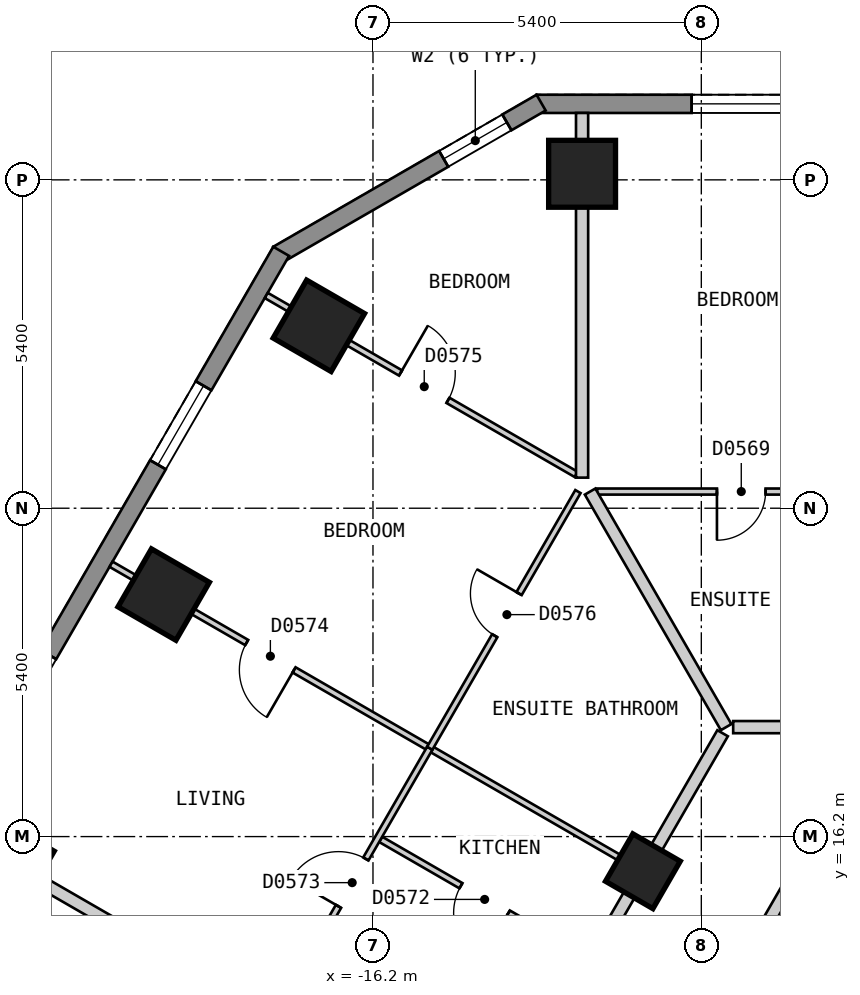
"""IFC4 building model, lengths in metres.
Left out: names, types, materials, properties, quantities, classifications, styles, units other than length and angle.
Written with IfcOpenShell. Run it as: python <this file> out.ifc"""

import sys

from ifc_helpers import new_model, si_unit, direction, frame, frame_2d, origin, origin_2d, place, context, subcontext, project, spatial, polyline, rectangle, outline, extrude, element, fill, save


model = new_model("IFC4")
c1 = context("Model", 3, precision=1e-05, world=origin(), true_north=direction((0.0, 1.0)))
c2 = subcontext(c1, "Body", "Model", "MODEL_VIEW")
j1 = project(units=[si_unit("LENGTHUNIT", "METRE"), si_unit("PLANEANGLEUNIT", "RADIAN")], contexts=[c1])
p1 = place(None, origin())
s1 = spatial("IfcSite", under=j1, at=p1, CompositionType="ELEMENT")
p2 = place(p1, origin())
s2 = spatial("IfcBuilding", under=s1, at=p2, CompositionType="ELEMENT")
p3 = place(p2, frame((0.0, 0.0, 50.4)))
s3 = spatial("IfcBuildingStorey", under=s2, at=p3, CompositionType="ELEMENT", Elevation=50.4)
for number, where, z_axis, x_axis in (
    (1, (-12.761, 27.1, 0.0), (0.0, 0.0, 1.0), (-1.0, 0.0, 0.0)),
    (2, (-17.09, 24.6, 0.0), (0.0, 0.0, 1.0), (-0.5, -0.866, 0.0)),
    (3, (-19.642, 20.18, 0.0), (0.0, 0.0, 1.0), (-0.5, -0.866, 0.0)),
    (4, (-22.194, 15.759, 0.0), (0.0, 0.0, 1.0), (-0.5, -0.866, 0.0)),
):
    element("IfcColumn", number, at=place(p3, frame(where, z_axis=z_axis, x_axis=x_axis)), inside=s3, PredefinedType="COLUMN", context=c2, shape_type="SweptSolid", body=[
        extrude(rectangle(XDim=1.1, YDim=1.1, at=origin_2d()), origin(), (0.0, 0.0, 1.0), 3.0),
    ])
p4 = place(p3, frame((-11.761, 15.63, 0.0), z_axis=(0.0, 0.0, 1.0), x_axis=(-0.499984884929, -0.866034130299, 0.0)))
e5 = element("IfcColumn", 5, at=p4, inside=s3, PredefinedType="COLUMN", context=c2, shape_type="SweptSolid", body=[
    extrude(rectangle(XDim=0.9, YDim=0.9, at=origin_2d()), origin(), (0.0, 0.0, 1.0), 3.0),
])
p5 = place(p3, frame((13.51, 28.25, 0.0), z_axis=(0.0, 0.0, 1.0), x_axis=(-1.0, 0.0, 0.0)))
e6 = element("IfcWall", 6, at=p5, inside=s3, PredefinedType="SOLIDWALL", context=c2, shape_type="SweptSolid", body=[
    extrude(outline(polyline([(0.0, -0.15), (27.02, -0.15), (26.94, 0.15), (0.08, 0.15), (0.0, -0.15)])), origin(), (0.0, 0.0, 1.0), 2.7),
])
p6 = place(p5, frame((2.553, 0.0, 0.15)))
e7 = element("IfcOpeningElement", 7, at=p6, cuts=e6, PredefinedType="OPENING", context=c2, shape_type="SweptSolid", body=[
    extrude(rectangle(XDim=1.5, YDim=2.1, at=frame_2d((0.75, 1.05))), frame((0.0, 0.16, 0.0), z_axis=(0.0, -1.0, 0.0), x_axis=(1.0, 0.0, 0.0)), (0.0, 0.0, 1.0), 0.32),
])
p7 = place(p5, frame((7.657, 0.0, 0.15)))
e8 = element("IfcOpeningElement", 8, at=p7, cuts=e6, PredefinedType="OPENING", context=c2, shape_type="SweptSolid", body=[
    extrude(rectangle(XDim=1.5, YDim=2.1, at=frame_2d((0.75, 1.05))), frame((0.0, 0.16, 0.0), z_axis=(0.0, -1.0, 0.0), x_axis=(1.0, 0.0, 0.0)), (0.0, 0.0, 1.0), 0.32),
])
p8 = place(p5, frame((12.761, 0.0, 0.15)))
e9 = element("IfcOpeningElement", 9, at=p8, cuts=e6, PredefinedType="OPENING", context=c2, shape_type="SweptSolid", body=[
    extrude(rectangle(XDim=1.5, YDim=2.1, at=frame_2d((0.75, 1.05))), frame((0.0, 0.16, 0.0), z_axis=(0.0, -1.0, 0.0), x_axis=(1.0, 0.0, 0.0)), (0.0, 0.0, 1.0), 0.32),
])
p9 = place(p5, frame((17.865, 0.0, 0.15)))
e10 = element("IfcOpeningElement", 10, at=p9, cuts=e6, PredefinedType="OPENING", context=c2, shape_type="SweptSolid", body=[
    extrude(rectangle(XDim=1.5, YDim=2.1, at=frame_2d((0.75, 1.05))), frame((0.0, 0.16, 0.0), z_axis=(0.0, -1.0, 0.0), x_axis=(1.0, 0.0, 0.0)), (0.0, 0.0, 1.0), 0.32),
])
p10 = place(p5, frame((22.969, 0.0, 0.15)))
e11 = element("IfcOpeningElement", 11, at=p10, cuts=e6, PredefinedType="OPENING", context=c2, shape_type="SweptSolid", body=[
    extrude(rectangle(XDim=1.5, YDim=2.1, at=frame_2d((0.75, 1.05))), frame((0.0, 0.16, 0.0), z_axis=(0.0, -1.0, 0.0), x_axis=(1.0, 0.0, 0.0)), (0.0, 0.0, 1.0), 0.32),
])
p11 = place(p3, frame((-13.435, 28.27, 0.0), z_axis=(0.0, 0.0, 1.0), x_axis=(-0.866010750942, -0.50002537861, 0.0)))
e12 = element("IfcWall", 12, at=p11, inside=s3, PredefinedType="SOLIDWALL", context=c2, shape_type="SweptSolid", body=[
    extrude(outline(polyline([(0.0, -0.15), (5.0, -0.15), (4.919, 0.15), (0.08, 0.15), (0.0, -0.15)])), origin(), (0.0, 0.0, 1.0), 2.7),
])
p12 = place(p11, frame((0.65, 0.0, 0.15)))
e13 = element("IfcOpeningElement", 13, at=p12, cuts=e12, PredefinedType="OPENING", context=c2, shape_type="SweptSolid", body=[
    extrude(rectangle(XDim=1.2, YDim=2.1, at=frame_2d((0.6, 1.05))), frame((0.0, 0.16, 0.0), z_axis=(0.0, -1.0, 0.0), x_axis=(1.0, 0.0, 0.0)), (0.0, 0.0, 1.0), 0.32),
])
p13 = place(p3, frame((-17.71, 25.825, 0.0), z_axis=(0.0, 0.0, 1.0), x_axis=(-0.500001938803, -0.866024284413, 0.0)))
e14 = element("IfcWall", 14, at=p13, inside=s3, PredefinedType="SOLIDWALL", context=c2, shape_type="SweptSolid", body=[
    extrude(outline(polyline([(0.0, -0.15), (27.02, -0.15), (26.94, 0.15), (0.08, 0.15), (0.0, -0.15)])), origin(), (0.0, 0.0, 1.0), 2.7),
])
p14 = place(p13, frame((2.553, 0.0, 0.15)))
e15 = element("IfcOpeningElement", 15, at=p14, cuts=e14, PredefinedType="OPENING", context=c2, shape_type="SweptSolid", body=[
    extrude(rectangle(XDim=1.5, YDim=2.1, at=frame_2d((0.75, 1.05))), frame((0.0, 0.16, 0.0), z_axis=(0.0, -1.0, 0.0), x_axis=(1.0, 0.0, 0.0)), (0.0, 0.0, 1.0), 0.32),
])
p15 = place(p13, frame((7.658, 0.0, 0.15)))
e16 = element("IfcOpeningElement", 16, at=p15, cuts=e14, PredefinedType="OPENING", context=c2, shape_type="SweptSolid", body=[
    extrude(rectangle(XDim=1.5, YDim=2.1, at=frame_2d((0.75, 1.05))), frame((0.0, 0.16, 0.0), z_axis=(0.0, -1.0, 0.0), x_axis=(1.0, 0.0, 0.0)), (0.0, 0.0, 1.0), 0.32),
])
p16 = place(p13, frame((12.761, 0.0, 0.15)))
e17 = element("IfcOpeningElement", 17, at=p16, cuts=e14, PredefinedType="OPENING", context=c2, shape_type="SweptSolid", body=[
    extrude(rectangle(XDim=1.5, YDim=2.1, at=frame_2d((0.75, 1.05))), frame((0.0, 0.16, 0.0), z_axis=(0.0, -1.0, 0.0), x_axis=(1.0, 0.0, 0.0)), (0.0, 0.0, 1.0), 0.32),
])
p17 = place(p13, frame((17.865, 0.0, 0.15)))
e18 = element("IfcOpeningElement", 18, at=p17, cuts=e14, PredefinedType="OPENING", context=c2, shape_type="SweptSolid", body=[
    extrude(rectangle(XDim=1.5, YDim=2.1, at=frame_2d((0.75, 1.05))), frame((0.0, 0.16, 0.0), z_axis=(0.0, -1.0, 0.0), x_axis=(1.0, 0.0, 0.0)), (0.0, 0.0, 1.0), 0.32),
])
p18 = place(p13, frame((22.969, 0.0, 0.15)))
e19 = element("IfcOpeningElement", 19, at=p18, cuts=e14, PredefinedType="OPENING", context=c2, shape_type="SweptSolid", body=[
    extrude(rectangle(XDim=1.5, YDim=2.1, at=frame_2d((0.75, 1.05))), frame((0.0, 0.16, 0.0), z_axis=(0.0, -1.0, 0.0), x_axis=(1.0, 0.0, 0.0)), (0.0, 0.0, 1.0), 0.32),
])
p19 = place(p3, frame((-10.276, 18.0, 0.0), z_axis=(0.0, 0.0, 1.0), x_axis=(1.0, 0.0, 0.0)))
e20 = element("IfcWall", 20, at=p19, inside=s3, PredefinedType="PARTITIONING", context=c2, shape_type="SweptSolid", body=[
    extrude(rectangle(XDim=20.553, YDim=0.2, at=frame_2d((10.276, 0.0))), origin(), (0.0, 0.0, 1.0), 2.7),
])
p20 = place(p19, frame((14.879, 0.0, 0.0)))
e21 = element("IfcOpeningElement", 21, at=p20, cuts=e20, PredefinedType="OPENING", context=c2, shape_type="SweptSolid", body=[
    extrude(rectangle(XDim=1.0, YDim=2.1, at=frame_2d((0.5, 1.05))), frame((0.0, 0.11, 0.0), z_axis=(0.0, -1.0, 0.0), x_axis=(1.0, 0.0, 0.0)), (0.0, 0.0, 1.0), 0.22),
])
p21 = place(p19, frame((4.671, 0.0, 0.0)))
e22 = element("IfcOpeningElement", 22, at=p21, cuts=e20, PredefinedType="OPENING", context=c2, shape_type="SweptSolid", body=[
    extrude(rectangle(XDim=1.0, YDim=2.1, at=frame_2d((0.5, 1.05))), frame((0.0, 0.11, 0.0), z_axis=(0.0, -1.0, 0.0), x_axis=(1.0, 0.0, 0.0)), (0.0, 0.0, 1.0), 0.22),
])
p22 = place(p3, frame((-10.854, 8.0, 0.0), z_axis=(0.0, 0.0, 1.0), x_axis=(0.499964141897, 0.86604610548, 0.0)))
e23 = element("IfcWall", 23, at=p22, inside=s3, PredefinedType="PARTITIONING", context=c2, shape_type="SweptSolid", body=[
    extrude(rectangle(XDim=9.007, YDim=0.2, at=frame_2d((4.503, 0.0))), origin(), (0.0, 0.0, 1.0), 2.7),
])
p23 = place(p3, frame((-18.244, -0.001, 0.0), z_axis=(0.0, 0.0, 1.0), x_axis=(0.499962999376, 0.866046765051, 0.0)))
e24 = element("IfcWall", 24, at=p23, inside=s3, PredefinedType="PARTITIONING", context=c2, shape_type="SweptSolid", body=[
    extrude(rectangle(XDim=18.245, YDim=0.2, at=frame_2d((9.123, 0.0))), origin(), (0.0, 0.0, 1.0), 2.7),
])
p24 = place(p23, frame((8.672, 0.0, 0.0)))
e25 = element("IfcOpeningElement", 25, at=p24, cuts=e24, PredefinedType="OPENING", context=c2, shape_type="SweptSolid", body=[
    extrude(rectangle(XDim=0.9, YDim=2.1, at=frame_2d((0.45, 1.05))), frame((0.0, 0.11, 0.0), z_axis=(0.0, -1.0, 0.0), x_axis=(1.0, 0.0, 0.0)), (0.0, 0.0, 1.0), 0.22),
])
p25 = place(p3, frame((-20.727, 0.099, 0.0), z_axis=(0.0, 0.0, 1.0), x_axis=(0.499993204491, 0.866029327138, 0.0)))
e26 = element("IfcWall", 26, at=p25, inside=s3, PredefinedType="PARTITIONING", context=c2, shape_type="SweptSolid", body=[
    extrude(rectangle(XDim=20.554, YDim=0.2, at=frame_2d((10.277, 0.0))), origin(), (0.0, 0.0, 1.0), 2.7),
])
p26 = place(p25, frame((9.776, 0.0, 0.0)))
e27 = element("IfcOpeningElement", 27, at=p26, cuts=e26, PredefinedType="OPENING", context=c2, shape_type="SweptSolid", body=[
    extrude(rectangle(XDim=1.0, YDim=2.1, at=frame_2d((0.5, 1.05))), frame((0.0, 0.11, 0.0), z_axis=(0.0, -1.0, 0.0), x_axis=(1.0, 0.0, 0.0)), (0.0, 0.0, 1.0), 0.22),
])
p27 = place(p25, frame((4.673, 0.0, 0.0)))
e28 = element("IfcOpeningElement", 28, at=p27, cuts=e26, PredefinedType="OPENING", context=c2, shape_type="SweptSolid", body=[
    extrude(rectangle(XDim=1.0, YDim=2.1, at=frame_2d((0.5, 1.05))), frame((0.0, 0.11, 0.0), z_axis=(0.0, -1.0, 0.0), x_axis=(1.0, 0.0, 0.0)), (0.0, 0.0, 1.0), 0.22),
])
p28 = place(p25, frame((14.88, 0.0, 0.0)))
e29 = element("IfcOpeningElement", 29, at=p28, cuts=e26, PredefinedType="OPENING", context=c2, shape_type="SweptSolid", body=[
    extrude(rectangle(XDim=1.0, YDim=2.1, at=frame_2d((0.5, 1.05))), frame((0.0, 0.11, 0.0), z_axis=(0.0, -1.0, 0.0), x_axis=(1.0, 0.0, 0.0)), (0.0, 0.0, 1.0), 0.22),
])
p29 = place(p3, frame((-16.073, 16.154, 0.0), z_axis=(0.0, 0.0, 1.0), x_axis=(0.865979019114, -0.500080332001, 0.0)))
e30 = element("IfcWall", 30, at=p29, inside=s3, PredefinedType="PARTITIONING", context=c2, shape_type="SweptSolid", body=[
    extrude(rectangle(XDim=3.897, YDim=0.1, at=frame_2d((1.949, 0.0))), origin(), (0.0, 0.0, 1.0), 2.7),
])
p30 = place(p29, frame((1.524, 0.0, 0.0)))
e31 = element("IfcOpeningElement", 31, at=p30, cuts=e30, PredefinedType="OPENING", context=c2, shape_type="SweptSolid", body=[
    extrude(rectangle(XDim=0.9, YDim=2.1, at=frame_2d((0.45, 1.05))), frame((0.0, 0.06, 0.0), z_axis=(0.0, -1.0, 0.0), x_axis=(1.0, 0.0, 0.0)), (0.0, 0.0, 1.0), 0.12),
])
p31 = place(p3, frame((-20.508, 20.679, 0.0), z_axis=(0.0, 0.0, 1.0), x_axis=(0.866047370643, -0.499961950354, 0.0)))
e32 = element("IfcWall", 32, at=p31, inside=s3, PredefinedType="PARTITIONING", context=c2, shape_type="SweptSolid", body=[
    extrude(rectangle(XDim=10.001, YDim=0.1, at=frame_2d((5.0, 0.0))), origin(), (0.0, 0.0, 1.0), 2.7),
])
p32 = place(p31, frame((2.576, 0.0, 0.0)))
e33 = element("IfcOpeningElement", 33, at=p32, cuts=e32, PredefinedType="OPENING", context=c2, shape_type="SweptSolid", body=[
    extrude(rectangle(XDim=0.9, YDim=2.1, at=frame_2d((0.45, 1.05))), frame((0.0, 0.06, 0.0), z_axis=(0.0, -1.0, 0.0), x_axis=(1.0, 0.0, 0.0)), (0.0, 0.0, 1.0), 0.12),
])
p33 = place(p3, frame((-17.955, 25.099, 0.0), z_axis=(0.0, 0.0, 1.0), x_axis=(0.866036353684, -0.499981033738, 0.0)))
e34 = element("IfcWall", 34, at=p33, inside=s3, PredefinedType="PARTITIONING", context=c2, shape_type="SweptSolid", body=[
    extrude(rectangle(XDim=5.885, YDim=0.1, at=frame_2d((2.942, 0.0))), origin(), (0.0, 0.0, 1.0), 2.7),
])
p34 = place(p33, frame((2.55, 0.0, 0.0)))
e35 = element("IfcOpeningElement", 35, at=p34, cuts=e34, PredefinedType="OPENING", context=c2, shape_type="SweptSolid", body=[
    extrude(rectangle(XDim=0.9, YDim=2.1, at=frame_2d((0.45, 1.05))), frame((0.0, 0.06, 0.0), z_axis=(0.0, -1.0, 0.0), x_axis=(1.0, 0.0, 0.0)), (0.0, 0.0, 1.0), 0.12),
])
p35 = place(p3, frame((-12.513, 21.874, 0.0), z_axis=(0.0, 0.0, 1.0), x_axis=(1.0, 0.0, 0.0)))
e36 = element("IfcWall", 36, at=p35, inside=s3, PredefinedType="PARTITIONING", context=c2, shape_type="SweptSolid", body=[
    extrude(rectangle(XDim=4.806, YDim=0.1, at=frame_2d((2.403, 0.0))), origin(), (0.0, 0.0, 1.0), 2.7),
])
p36 = place(p35, frame((1.97, 0.0, 0.0)))
e37 = element("IfcOpeningElement", 37, at=p36, cuts=e36, PredefinedType="OPENING", context=c2, shape_type="SweptSolid", body=[
    extrude(rectangle(XDim=0.8, YDim=2.1, at=frame_2d((0.4, 1.05))), frame((0.0, 0.06, 0.0), z_axis=(0.0, -1.0, 0.0), x_axis=(1.0, 0.0, 0.0)), (0.0, 0.0, 1.0), 0.12),
])
p37 = place(p3, frame((-17.768, 13.319, 0.0), z_axis=(0.0, 0.0, 1.0), x_axis=(0.499958946799, 0.866049104564, 0.0)))
e38 = element("IfcWall", 38, at=p37, inside=s3, PredefinedType="PARTITIONING", context=c2, shape_type="SweptSolid", body=[
    extrude(rectangle(XDim=5.004, YDim=0.1, at=frame_2d((2.502, 0.0))), origin(), (0.0, 0.0, 1.0), 2.7),
])
p38 = place(p37, frame((2.002, 0.0, 0.0)))
e39 = element("IfcOpeningElement", 39, at=p38, cuts=e38, PredefinedType="OPENING", context=c2, shape_type="SweptSolid", body=[
    extrude(rectangle(XDim=0.9, YDim=2.1, at=frame_2d((0.45, 1.05))), frame((0.0, 0.06, 0.0), z_axis=(0.0, -1.0, 0.0), x_axis=(1.0, 0.0, 0.0)), (0.0, 0.0, 1.0), 0.12),
])
p39 = place(p3, frame((-12.629, 21.874, 0.0), z_axis=(0.0, 0.0, 1.0), x_axis=(0.500024801635, -0.86601108408, 0.0)))
e40 = element("IfcWall", 40, at=p39, inside=s3, PredefinedType="PARTITIONING", context=c2, shape_type="SweptSolid", body=[
    extrude(rectangle(XDim=4.473, YDim=0.2, at=frame_2d((2.237, 0.0))), origin(), (0.0, 0.0, 1.0), 2.7),
])
p40 = place(p3, frame((-23.06, 16.259, 0.0), z_axis=(0.0, 0.0, 1.0), x_axis=(0.866047370643, -0.499961950354, 0.0)))
e41 = element("IfcWall", 41, at=p40, inside=s3, PredefinedType="PARTITIONING", context=c2, shape_type="SweptSolid", body=[
    extrude(rectangle(XDim=10.001, YDim=0.2, at=frame_2d((5.0, 0.0))), origin(), (0.0, 0.0, 1.0), 2.7),
])
p41 = place(p3, frame((-12.761, 22.103, 0.0), z_axis=(0.0, 0.0, 1.0), x_axis=(0.0, 1.0, 0.0)))
e42 = element("IfcWall", 42, at=p41, inside=s3, PredefinedType="PARTITIONING", context=c2, shape_type="SweptSolid", body=[
    extrude(rectangle(XDim=5.997, YDim=0.2, at=frame_2d((2.999, 0.0))), origin(), (0.0, 0.0, 1.0), 2.7),
])
p42 = place(p3, frame((-15.266, 17.653, 0.0), z_axis=(0.0, 0.0, 1.0), x_axis=(0.500007182864, 0.866021256716, 0.0)))
e43 = element("IfcWall", 43, at=p42, inside=s3, PredefinedType="PARTITIONING", context=c2, shape_type="SweptSolid", body=[
    extrude(rectangle(XDim=4.874, YDim=0.1, at=frame_2d((2.437, 0.0))), origin(), (0.0, 0.0, 1.0), 2.7),
])
p43 = place(p42, frame((2.137, 0.0, 0.0)))
e44 = element("IfcOpeningElement", 44, at=p43, cuts=e43, PredefinedType="OPENING", context=c2, shape_type="SweptSolid", body=[
    extrude(rectangle(XDim=0.8, YDim=2.1, at=frame_2d((0.4, 1.05))), frame((0.0, 0.06, 0.0), z_axis=(0.0, -1.0, 0.0), x_axis=(1.0, 0.0, 0.0)), (0.0, 0.0, 1.0), 0.12),
])
p44 = place(p10, origin())
e45 = element("IfcWindow", 45, at=p44, inside=s3, PartitioningType="SINGLE_PANEL", PredefinedType="WINDOW", context=c2, shape_type="SweptSolid", body=[
    extrude(rectangle(XDim=1.5, YDim=2.1, at=frame_2d((0.75, 1.05))), frame((0.0, 0.03, 0.0), z_axis=(0.0, -1.0, 0.0), x_axis=(1.0, 0.0, 0.0)), (0.0, 0.0, 1.0), 0.06),
])
fill(e11, e45)
p45 = place(p12, origin())
e46 = element("IfcWindow", 46, at=p45, inside=s3, PartitioningType="SINGLE_PANEL", PredefinedType="WINDOW", context=c2, shape_type="SweptSolid", body=[
    extrude(rectangle(XDim=1.2, YDim=2.1, at=frame_2d((0.6, 1.05))), frame((0.0, 0.03, 0.0), z_axis=(0.0, -1.0, 0.0), x_axis=(1.0, 0.0, 0.0)), (0.0, 0.0, 1.0), 0.06),
])
fill(e13, e46)
p46 = place(p14, origin())
e47 = element("IfcWindow", 47, at=p46, inside=s3, PartitioningType="SINGLE_PANEL", PredefinedType="WINDOW", context=c2, shape_type="SweptSolid", body=[
    extrude(rectangle(XDim=1.5, YDim=2.1, at=frame_2d((0.75, 1.05))), frame((0.0, 0.03, 0.0), z_axis=(0.0, -1.0, 0.0), x_axis=(1.0, 0.0, 0.0)), (0.0, 0.0, 1.0), 0.06),
])
fill(e15, e47)
p47 = place(p36, origin())
e48 = element("IfcDoor", 48, at=p47, inside=s3, OperationType="SINGLE_SWING_LEFT", PredefinedType="DOOR", context=c2, shape_type="SweptSolid", body=[
    extrude(rectangle(XDim=0.8, YDim=2.1, at=frame_2d((0.4, 1.05))), frame((0.0, 0.025, 0.0), z_axis=(0.0, -1.0, 0.0), x_axis=(1.0, 0.0, 0.0)), (0.0, 0.0, 1.0), 0.05),
])
fill(e37, e48)
p48 = place(p30, origin())
e49 = element("IfcDoor", 49, at=p48, inside=s3, OperationType="SINGLE_SWING_RIGHT", PredefinedType="DOOR", context=c2, shape_type="SweptSolid", body=[
    extrude(rectangle(XDim=0.9, YDim=2.1, at=frame_2d((0.45, 1.05))), frame((0.0, 0.025, 0.0), z_axis=(0.0, -1.0, 0.0), x_axis=(1.0, 0.0, 0.0)), (0.0, 0.0, 1.0), 0.05),
])
fill(e31, e49)
p49 = place(p38, origin())
e50 = element("IfcDoor", 50, at=p49, inside=s3, OperationType="SINGLE_SWING_LEFT", PredefinedType="DOOR", context=c2, shape_type="SweptSolid", body=[
    extrude(rectangle(XDim=0.9, YDim=2.1, at=frame_2d((0.45, 1.05))), frame((0.0, 0.025, 0.0), z_axis=(0.0, -1.0, 0.0), x_axis=(1.0, 0.0, 0.0)), (0.0, 0.0, 1.0), 0.05),
])
fill(e39, e50)
p50 = place(p32, origin())
e51 = element("IfcDoor", 51, at=p50, inside=s3, OperationType="SINGLE_SWING_RIGHT", PredefinedType="DOOR", context=c2, shape_type="SweptSolid", body=[
    extrude(rectangle(XDim=0.9, YDim=2.1, at=frame_2d((0.45, 1.05))), frame((0.0, 0.025, 0.0), z_axis=(0.0, -1.0, 0.0), x_axis=(1.0, 0.0, 0.0)), (0.0, 0.0, 1.0), 0.05),
])
fill(e33, e51)
p51 = place(p34, origin())
e52 = element("IfcDoor", 52, at=p51, inside=s3, OperationType="SINGLE_SWING_LEFT", PredefinedType="DOOR", context=c2, shape_type="SweptSolid", body=[
    extrude(rectangle(XDim=0.9, YDim=2.1, at=frame_2d((0.45, 1.05))), frame((0.0, 0.025, 0.0), z_axis=(0.0, -1.0, 0.0), x_axis=(1.0, 0.0, 0.0)), (0.0, 0.0, 1.0), 0.05),
])
fill(e35, e52)
p52 = place(p43, origin())
e53 = element("IfcDoor", 53, at=p52, inside=s3, OperationType="SINGLE_SWING_RIGHT", PredefinedType="DOOR", context=c2, shape_type="SweptSolid", body=[
    extrude(rectangle(XDim=0.8, YDim=2.1, at=frame_2d((0.4, 1.05))), frame((0.0, 0.025, 0.0), z_axis=(0.0, -1.0, 0.0), x_axis=(1.0, 0.0, 0.0)), (0.0, 0.0, 1.0), 0.05),
])
fill(e44, e53)
save(model, sys.argv[1])
